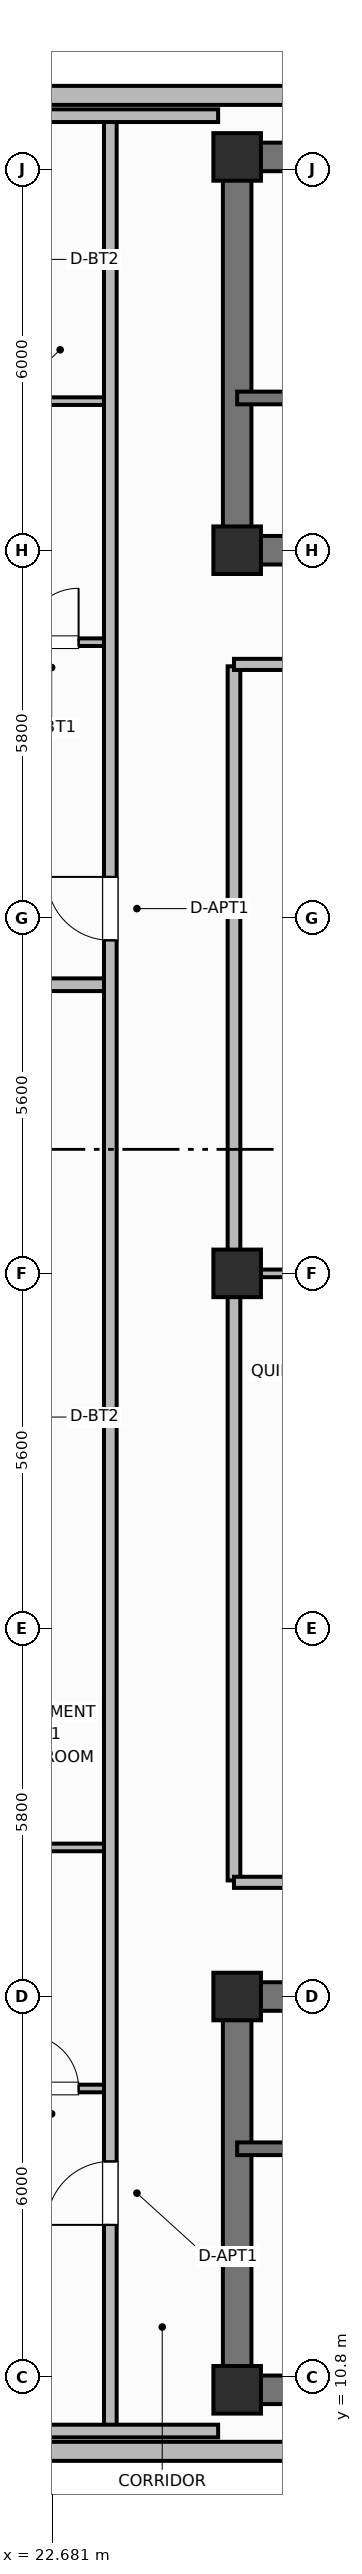
"""IFC4 building model, lengths in metres.
Left out: names, types, materials, properties, quantities, classifications, styles, units other than length and angle.
Written with IfcOpenShell. Run it as: python <this file> out.ifc"""

import sys

from ifc_helpers import new_model, si_unit, direction, frame, frame_2d, origin, origin_2d, place, context, subcontext, project, spatial, rectangle, extrude, element, fill, save


model = new_model("IFC4")
c1 = context("Model", 3, precision=1e-05, world=origin(), true_north=direction((0.0, 1.0)))
c2 = subcontext(c1, "Body", "Model", "MODEL_VIEW")
j1 = project(units=[si_unit("LENGTHUNIT", "METRE"), si_unit("PLANEANGLEUNIT", "RADIAN")], contexts=[c1])
p1 = place(None, origin())
s1 = spatial("IfcSite", under=j1, at=p1, CompositionType="ELEMENT")
p2 = place(p1, origin())
s2 = spatial("IfcBuilding", under=s1, at=p2, CompositionType="ELEMENT")
p3 = place(p2, frame((0.0, 0.0, 293.5)))
s3 = spatial("IfcBuildingStorey", under=s2, at=p3, CompositionType="ELEMENT", Elevation=293.5)
p4 = place(p3, frame((52.8, 10.6, 0.0), z_axis=(0.0, 0.0, 1.0), x_axis=(-1.0, 0.0, 0.0)))
e1 = element("IfcWall", 1, at=p4, inside=s3, PredefinedType="SHEAR", context=c2, shape_type="SweptSolid", body=[
    extrude(rectangle(XDim=27.2, YDim=0.45, at=frame_2d((13.6, 0.0))), origin(), (0.0, 0.0, 1.0), 3.7),
])
p5 = place(p3, frame((25.6, 10.825, 0.0), z_axis=(0.0, 0.0, 1.0), x_axis=(0.0, 1.0, 0.0)))
e2 = element("IfcWall", 2, at=p5, inside=s3, PredefinedType="SHEAR", context=c2, shape_type="SweptSolid", body=[
    extrude(rectangle(XDim=5.75, YDim=0.45, at=frame_2d((2.875, 0.0))), origin(), (0.0, 0.0, 1.0), 3.7),
])
p6 = place(p3, frame((25.6, 16.8, 0.0), z_axis=(0.0, 0.0, 1.0), x_axis=(1.0, 0.0, 0.0)))
e3 = element("IfcWall", 3, at=p6, inside=s3, PredefinedType="SHEAR", context=c2, shape_type="SweptSolid", body=[
    extrude(rectangle(XDim=27.2, YDim=0.45, at=frame_2d((13.6, 0.0))), origin(), (0.0, 0.0, 1.0), 3.7),
])
p7 = place(p6, frame((1.7, 0.0, 0.0)))
e4 = element("IfcOpeningElement", 4, at=p7, cuts=e3, PredefinedType="OPENING", context=c2, shape_type="SweptSolid", body=[
    extrude(rectangle(XDim=1.1, YDim=2.15, at=frame_2d((0.55, 1.075))), frame((0.0, 0.235, 0.0), z_axis=(0.0, -1.0, 0.0), x_axis=(1.0, 0.0, 0.0)), (0.0, 0.0, 1.0), 0.47),
])
p8 = place(p6, frame((4.45, 0.0, 0.0)))
e5 = element("IfcOpeningElement", 5, at=p8, cuts=e3, PredefinedType="OPENING", context=c2, shape_type="SweptSolid", body=[
    extrude(rectangle(XDim=0.85, YDim=2.1, at=frame_2d((0.425, 1.05))), frame((0.0, 0.235, 0.0), z_axis=(0.0, -1.0, 0.0), x_axis=(1.0, 0.0, 0.0)), (0.0, 0.0, 1.0), 0.47),
])
p9 = place(p6, frame((6.5, 0.0, 0.0)))
e6 = element("IfcOpeningElement", 6, at=p9, cuts=e3, PredefinedType="OPENING", context=c2, shape_type="SweptSolid", body=[
    extrude(rectangle(XDim=0.85, YDim=2.1, at=frame_2d((0.425, 1.05))), frame((0.0, 0.235, 0.0), z_axis=(0.0, -1.0, 0.0), x_axis=(1.0, 0.0, 0.0)), (0.0, 0.0, 1.0), 0.47),
])
p10 = place(p6, frame((13.0, 0.0, 0.0)))
e7 = element("IfcOpeningElement", 7, at=p10, cuts=e3, PredefinedType="OPENING", context=c2, shape_type="SweptSolid", body=[
    extrude(rectangle(XDim=1.2, YDim=2.15, at=frame_2d((0.6, 1.075))), frame((0.0, 0.235, 0.0), z_axis=(0.0, -1.0, 0.0), x_axis=(1.0, 0.0, 0.0)), (0.0, 0.0, 1.0), 0.47),
])
p11 = place(p6, frame((19.8, 0.0, 0.0)))
e8 = element("IfcOpeningElement", 8, at=p11, cuts=e3, PredefinedType="OPENING", context=c2, shape_type="SweptSolid", body=[
    extrude(rectangle(XDim=0.85, YDim=2.1, at=frame_2d((0.425, 1.05))), frame((0.0, 0.235, 0.0), z_axis=(0.0, -1.0, 0.0), x_axis=(1.0, 0.0, 0.0)), (0.0, 0.0, 1.0), 0.47),
])
p12 = place(p6, frame((24.2, 0.0, 0.0)))
e9 = element("IfcOpeningElement", 9, at=p12, cuts=e3, PredefinedType="OPENING", context=c2, shape_type="SweptSolid", body=[
    extrude(rectangle(XDim=0.85, YDim=2.1, at=frame_2d((0.425, 1.05))), frame((0.0, 0.235, 0.0), z_axis=(0.0, -1.0, 0.0), x_axis=(1.0, 0.0, 0.0)), (0.0, 0.0, 1.0), 0.47),
])
p13 = place(p3, frame((25.6, 45.8, 0.0), z_axis=(0.0, 0.0, 1.0), x_axis=(1.0, 0.0, 0.0)))
e10 = element("IfcWall", 10, at=p13, inside=s3, PredefinedType="SHEAR", context=c2, shape_type="SweptSolid", body=[
    extrude(rectangle(XDim=27.2, YDim=0.45, at=frame_2d((13.6, 0.0))), origin(), (0.0, 0.0, 1.0), 3.7),
])
p14 = place(p3, frame((25.6, 39.825, 0.0), z_axis=(0.0, 0.0, 1.0), x_axis=(0.0, 1.0, 0.0)))
e11 = element("IfcWall", 11, at=p14, inside=s3, PredefinedType="SHEAR", context=c2, shape_type="SweptSolid", body=[
    extrude(rectangle(XDim=5.75, YDim=0.45, at=frame_2d((2.875, 0.0))), origin(), (0.0, 0.0, 1.0), 3.7),
])
p15 = place(p3, frame((52.8, 39.6, 0.0), z_axis=(0.0, 0.0, 1.0), x_axis=(-1.0, 0.0, 0.0)))
e12 = element("IfcWall", 12, at=p15, inside=s3, PredefinedType="SHEAR", context=c2, shape_type="SweptSolid", body=[
    extrude(rectangle(XDim=27.2, YDim=0.45, at=frame_2d((13.6, 0.0))), origin(), (0.0, 0.0, 1.0), 3.7),
])
p16 = place(p15, frame((24.3, 0.0, 0.0)))
e13 = element("IfcOpeningElement", 13, at=p16, cuts=e12, PredefinedType="OPENING", context=c2, shape_type="SweptSolid", body=[
    extrude(rectangle(XDim=1.1, YDim=2.15, at=frame_2d((0.55, 1.075))), frame((0.0, 0.235, 0.0), z_axis=(0.0, -1.0, 0.0), x_axis=(1.0, 0.0, 0.0)), (0.0, 0.0, 1.0), 0.47),
])
p17 = place(p15, frame((21.85, 0.0, 0.0)))
e14 = element("IfcOpeningElement", 14, at=p17, cuts=e12, PredefinedType="OPENING", context=c2, shape_type="SweptSolid", body=[
    extrude(rectangle(XDim=0.85, YDim=2.1, at=frame_2d((0.425, 1.05))), frame((0.0, 0.235, 0.0), z_axis=(0.0, -1.0, 0.0), x_axis=(1.0, 0.0, 0.0)), (0.0, 0.0, 1.0), 0.47),
])
p18 = place(p15, frame((19.85, 0.0, 0.0)))
e15 = element("IfcOpeningElement", 15, at=p18, cuts=e12, PredefinedType="OPENING", context=c2, shape_type="SweptSolid", body=[
    extrude(rectangle(XDim=0.85, YDim=2.1, at=frame_2d((0.425, 1.05))), frame((0.0, 0.235, 0.0), z_axis=(0.0, -1.0, 0.0), x_axis=(1.0, 0.0, 0.0)), (0.0, 0.0, 1.0), 0.47),
])
p19 = place(p15, frame((15.1, 0.0, 0.0)))
e16 = element("IfcOpeningElement", 16, at=p19, cuts=e12, PredefinedType="OPENING", context=c2, shape_type="SweptSolid", body=[
    extrude(rectangle(XDim=1.2, YDim=2.15, at=frame_2d((0.6, 1.075))), frame((0.0, 0.235, 0.0), z_axis=(0.0, -1.0, 0.0), x_axis=(1.0, 0.0, 0.0)), (0.0, 0.0, 1.0), 0.47),
])
p20 = place(p15, frame((12.6, 0.0, 0.0)))
e17 = element("IfcOpeningElement", 17, at=p20, cuts=e12, PredefinedType="OPENING", context=c2, shape_type="SweptSolid", body=[
    extrude(rectangle(XDim=0.85, YDim=2.1, at=frame_2d((0.425, 1.05))), frame((0.0, 0.235, 0.0), z_axis=(0.0, -1.0, 0.0), x_axis=(1.0, 0.0, 0.0)), (0.0, 0.0, 1.0), 0.47),
])
p21 = place(p15, frame((10.85, 0.0, 0.0)))
e18 = element("IfcOpeningElement", 18, at=p21, cuts=e12, PredefinedType="OPENING", context=c2, shape_type="SweptSolid", body=[
    extrude(rectangle(XDim=0.85, YDim=2.1, at=frame_2d((0.425, 1.05))), frame((0.0, 0.235, 0.0), z_axis=(0.0, -1.0, 0.0), x_axis=(1.0, 0.0, 0.0)), (0.0, 0.0, 1.0), 0.47),
])
p22 = place(p15, frame((7.35, 0.0, 0.0)))
e19 = element("IfcOpeningElement", 19, at=p22, cuts=e12, PredefinedType="OPENING", context=c2, shape_type="SweptSolid", body=[
    extrude(rectangle(XDim=0.85, YDim=2.1, at=frame_2d((0.425, 1.05))), frame((0.0, 0.235, 0.0), z_axis=(0.0, -1.0, 0.0), x_axis=(1.0, 0.0, 0.0)), (0.0, 0.0, 1.0), 0.47),
])
p23 = place(p15, frame((4.2, 0.0, 0.0)))
e20 = element("IfcOpeningElement", 20, at=p23, cuts=e12, PredefinedType="OPENING", context=c2, shape_type="SweptSolid", body=[
    extrude(rectangle(XDim=1.3, YDim=2.2, at=frame_2d((0.65, 1.1))), frame((0.0, 0.235, 0.0), z_axis=(0.0, -1.0, 0.0), x_axis=(1.0, 0.0, 0.0)), (0.0, 0.0, 1.0), 0.47),
])
for number, where, z_axis, x_axis in (
    (21, (25.6, 10.6, 0.0), (0.0, 0.0, 1.0), (1.0, 0.0, 0.0)),
    (22, (25.6, 16.8, 0.0), (0.0, 0.0, 1.0), (1.0, 0.0, 0.0)),
    (23, (25.6, 39.6, 0.0), (0.0, 0.0, 1.0), (1.0, 0.0, 0.0)),
    (24, (25.6, 45.8, 0.0), (0.0, 0.0, 1.0), (1.0, 0.0, 0.0)),
    (25, (25.6, 28.2, 0.0), (0.0, 0.0, 1.0), (1.0, 0.0, 0.0)),
):
    element("IfcColumn", number, at=place(p3, frame(where, z_axis=z_axis, x_axis=x_axis)), inside=s3, PredefinedType="COLUMN", context=c2, shape_type="SweptSolid", body=[
        extrude(rectangle(XDim=0.75, YDim=0.75, at=origin_2d()), origin(), (0.0, 0.0, 1.0), 3.7),
    ])
p24 = place(p3, frame((22.56, 9.63, 0.0), z_axis=(0.0, 0.0, 1.0), x_axis=(1.0, 0.0, 0.0)))
e26 = element("IfcWall", 26, at=p24, inside=s3, PredefinedType="SOLIDWALL", context=c2, shape_type="SweptSolid", body=[
    extrude(rectangle(XDim=4.45, YDim=0.3, at=frame_2d((2.225, 0.0))), origin(), (0.0, 0.0, 1.0), 2.71),
])
p25 = place(p3, frame((48.19, 46.77, 0.0), z_axis=(0.0, 0.0, 1.0), x_axis=(-1.0, 0.0, 0.0)))
e27 = element("IfcWall", 27, at=p25, inside=s3, PredefinedType="SOLIDWALL", context=c2, shape_type="SweptSolid", body=[
    extrude(rectangle(XDim=25.63, YDim=0.3, at=frame_2d((12.815, 0.0))), origin(), (0.0, 0.0, 1.0), 2.71),
])
p26 = place(p25, frame((1.471, 0.0, 0.74)))
e28 = element("IfcOpeningElement", 28, at=p26, cuts=e27, PredefinedType="OPENING", context=c2, shape_type="SweptSolid", body=[
    extrude(rectangle(XDim=1.4, YDim=1.85, at=frame_2d((0.7, 0.925))), frame((0.0, 0.16, 0.0), z_axis=(0.0, -1.0, 0.0), x_axis=(1.0, 0.0, 0.0)), (0.0, 0.0, 1.0), 0.32),
])
p27 = place(p25, frame((7.553, 0.0, 0.74)))
e29 = element("IfcOpeningElement", 29, at=p27, cuts=e27, PredefinedType="OPENING", context=c2, shape_type="SweptSolid", body=[
    extrude(rectangle(XDim=1.4, YDim=1.85, at=frame_2d((0.7, 0.925))), frame((0.0, 0.16, 0.0), z_axis=(0.0, -1.0, 0.0), x_axis=(1.0, 0.0, 0.0)), (0.0, 0.0, 1.0), 0.32),
])
p28 = place(p25, frame((10.244, 0.0, 0.74)))
e30 = element("IfcOpeningElement", 30, at=p28, cuts=e27, PredefinedType="OPENING", context=c2, shape_type="SweptSolid", body=[
    extrude(rectangle(XDim=1.4, YDim=1.85, at=frame_2d((0.7, 0.925))), frame((0.0, 0.16, 0.0), z_axis=(0.0, -1.0, 0.0), x_axis=(1.0, 0.0, 0.0)), (0.0, 0.0, 1.0), 0.32),
])
p29 = place(p25, frame((14.336, 0.0, 0.74)))
e31 = element("IfcOpeningElement", 31, at=p29, cuts=e27, PredefinedType="OPENING", context=c2, shape_type="SweptSolid", body=[
    extrude(rectangle(XDim=1.4, YDim=1.85, at=frame_2d((0.7, 0.925))), frame((0.0, 0.16, 0.0), z_axis=(0.0, -1.0, 0.0), x_axis=(1.0, 0.0, 0.0)), (0.0, 0.0, 1.0), 0.32),
])
p30 = place(p25, frame((16.677, 0.0, 0.74)))
e32 = element("IfcOpeningElement", 32, at=p30, cuts=e27, PredefinedType="OPENING", context=c2, shape_type="SweptSolid", body=[
    extrude(rectangle(XDim=1.4, YDim=1.85, at=frame_2d((0.7, 0.925))), frame((0.0, 0.16, 0.0), z_axis=(0.0, -1.0, 0.0), x_axis=(1.0, 0.0, 0.0)), (0.0, 0.0, 1.0), 0.32),
])
p31 = place(p25, frame((19.718, 0.0, 0.74)))
e33 = element("IfcOpeningElement", 33, at=p31, cuts=e27, PredefinedType="OPENING", context=c2, shape_type="SweptSolid", body=[
    extrude(rectangle(XDim=1.4, YDim=1.85, at=frame_2d((0.7, 0.925))), frame((0.0, 0.16, 0.0), z_axis=(0.0, -1.0, 0.0), x_axis=(1.0, 0.0, 0.0)), (0.0, 0.0, 1.0), 0.32),
])
p32 = place(p3, frame((25.6, 14.4, 0.0), z_axis=(0.0, 0.0, 1.0), x_axis=(1.0, 0.0, 0.0)))
e34 = element("IfcWall", 34, at=p32, inside=s3, PredefinedType="SHEAR", context=c2, shape_type="SweptSolid", body=[
    extrude(rectangle(XDim=9.55, YDim=0.2, at=frame_2d((4.775, 0.0))), origin(), (0.0, 0.0, 1.0), 3.7),
])
p33 = place(p32, frame((1.05, 0.0, 0.0)))
e35 = element("IfcOpeningElement", 35, at=p33, cuts=e34, PredefinedType="OPENING", context=c2, shape_type="SweptSolid", body=[
    extrude(rectangle(XDim=1.1, YDim=2.15, at=frame_2d((0.55, 1.075))), frame((0.0, 0.11, 0.0), z_axis=(0.0, -1.0, 0.0), x_axis=(1.0, 0.0, 0.0)), (0.0, 0.0, 1.0), 0.22),
])
p34 = place(p3, frame((35.15, 42.0, 0.0), z_axis=(0.0, 0.0, 1.0), x_axis=(-1.0, 0.0, 0.0)))
e36 = element("IfcWall", 36, at=p34, inside=s3, PredefinedType="SHEAR", context=c2, shape_type="SweptSolid", body=[
    extrude(rectangle(XDim=9.55, YDim=0.2, at=frame_2d((4.775, 0.0))), origin(), (0.0, 0.0, 1.0), 3.7),
])
p35 = place(p34, frame((7.25, 0.0, 0.0)))
e37 = element("IfcOpeningElement", 37, at=p35, cuts=e36, PredefinedType="OPENING", context=c2, shape_type="SweptSolid", body=[
    extrude(rectangle(XDim=1.1, YDim=2.15, at=frame_2d((0.55, 1.075))), frame((0.0, 0.11, 0.0), z_axis=(0.0, -1.0, 0.0), x_axis=(1.0, 0.0, 0.0)), (0.0, 0.0, 1.0), 0.22),
])
p36 = place(p3, frame((25.55, 18.63, 0.0), z_axis=(0.0, 0.0, 1.0), x_axis=(0.0, 1.0, 0.0)))
e38 = element("IfcWall", 38, at=p36, inside=s3, PredefinedType="PARTITIONING", context=c2, shape_type="SweptSolid", body=[
    extrude(rectangle(XDim=19.14, YDim=0.2, at=frame_2d((9.57, 0.0))), origin(), (0.0, 0.0, 1.0), 2.54),
])
for number, where, z_axis, x_axis in (
    (39, (25.55, 18.6, 0.0), (0.0, 0.0, 1.0), (1.0, 0.0, 0.0)),
    (40, (25.55, 37.8, 0.0), (0.0, 0.0, 1.0), (1.0, 0.0, 0.0)),
):
    element("IfcWall", number, at=place(p3, frame(where, z_axis=z_axis, x_axis=x_axis)), inside=s3, PredefinedType="PARTITIONING", context=c2, shape_type="SweptSolid", body=[
        extrude(rectangle(XDim=2.7, YDim=0.175, at=frame_2d((1.35, 0.0))), origin(), (0.0, 0.0, 1.0), 2.54),
    ])
p37 = place(p3, frame((25.6, 28.2, 0.0), z_axis=(0.0, 0.0, 1.0), x_axis=(1.0, 0.0, 0.0)))
e41 = element("IfcWall", 41, at=p37, inside=s3, PredefinedType="PARTITIONING", context=c2, shape_type="SweptSolid", body=[
    extrude(rectangle(XDim=2.66, YDim=0.12, at=frame_2d((1.33, 0.0))), origin(), (0.0, 0.0, 1.0), 2.54),
])
p38 = place(p3, frame((21.65, 15.35, 0.0), z_axis=(0.0, 0.0, 1.0), x_axis=(1.0, 0.0, 0.0)))
e42 = element("IfcWall", 42, at=p38, inside=s3, PredefinedType="PARTITIONING", context=c2, shape_type="SweptSolid", body=[
    extrude(rectangle(XDim=1.95, YDim=0.12, at=frame_2d((0.975, 0.0))), origin(), (0.0, 0.0, 1.0), 2.54),
])
p39 = place(p38, frame((0.6, 0.0, 0.0)))
e43 = element("IfcOpeningElement", 43, at=p39, cuts=e42, PredefinedType="OPENING", context=c2, shape_type="SweptSolid", body=[
    extrude(rectangle(XDim=0.85, YDim=2.1, at=frame_2d((0.425, 1.05))), frame((0.0, 0.07, 0.0), z_axis=(0.0, -1.0, 0.0), x_axis=(1.0, 0.0, 0.0)), (0.0, 0.0, 1.0), 0.14),
])
p40 = place(p3, frame((21.65, 19.15, 0.0), z_axis=(0.0, 0.0, 1.0), x_axis=(1.0, 0.0, 0.0)))
e44 = element("IfcWall", 44, at=p40, inside=s3, PredefinedType="PARTITIONING", context=c2, shape_type="SweptSolid", body=[
    extrude(rectangle(XDim=1.95, YDim=0.12, at=frame_2d((0.975, 0.0))), origin(), (0.0, 0.0, 1.0), 2.54),
])
p41 = place(p3, frame((19.53, 32.75, 0.0), z_axis=(0.0, 0.0, 1.0), x_axis=(1.0, 0.0, 0.0)))
e45 = element("IfcWall", 45, at=p41, inside=s3, PredefinedType="PARTITIONING", context=c2, shape_type="SweptSolid", body=[
    extrude(rectangle(XDim=4.07, YDim=0.2, at=frame_2d((2.035, 0.0))), origin(), (0.0, 0.0, 1.0), 2.54),
])
p42 = place(p3, frame((21.65, 38.15, 0.0), z_axis=(0.0, 0.0, 1.0), x_axis=(1.0, 0.0, 0.0)))
e46 = element("IfcWall", 46, at=p42, inside=s3, PredefinedType="PARTITIONING", context=c2, shape_type="SweptSolid", body=[
    extrude(rectangle(XDim=1.95, YDim=0.12, at=frame_2d((0.975, 0.0))), origin(), (0.0, 0.0, 1.0), 2.54),
])
p43 = place(p42, frame((0.6, 0.0, 0.0)))
e47 = element("IfcOpeningElement", 47, at=p43, cuts=e46, PredefinedType="OPENING", context=c2, shape_type="SweptSolid", body=[
    extrude(rectangle(XDim=0.85, YDim=2.1, at=frame_2d((0.425, 1.05))), frame((0.0, 0.07, 0.0), z_axis=(0.0, -1.0, 0.0), x_axis=(1.0, 0.0, 0.0)), (0.0, 0.0, 1.0), 0.14),
])
p44 = place(p3, frame((21.65, 41.95, 0.0), z_axis=(0.0, 0.0, 1.0), x_axis=(1.0, 0.0, 0.0)))
e48 = element("IfcWall", 48, at=p44, inside=s3, PredefinedType="PARTITIONING", context=c2, shape_type="SweptSolid", body=[
    extrude(rectangle(XDim=1.95, YDim=0.12, at=frame_2d((0.975, 0.0))), origin(), (0.0, 0.0, 1.0), 2.54),
])
p45 = place(p3, frame((23.6, 9.95, 0.0), z_axis=(0.0, 0.0, 1.0), x_axis=(0.0, 1.0, 0.0)))
e49 = element("IfcWall", 49, at=p45, inside=s3, PredefinedType="PARTITIONING", context=c2, shape_type="SweptSolid", body=[
    extrude(rectangle(XDim=36.5, YDim=0.2, at=frame_2d((18.25, 0.0))), origin(), (0.0, 0.0, 1.0), 2.54),
])
p46 = place(p45, frame((3.25, 0.0, 0.0)))
e50 = element("IfcOpeningElement", 50, at=p46, cuts=e49, PredefinedType="OPENING", context=c2, shape_type="SweptSolid", body=[
    extrude(rectangle(XDim=1.0, YDim=2.15, at=frame_2d((0.5, 1.075))), frame((0.0, 0.11, 0.0), z_axis=(0.0, -1.0, 0.0), x_axis=(1.0, 0.0, 0.0)), (0.0, 0.0, 1.0), 0.22),
])
p47 = place(p45, frame((23.5, 0.0, 0.0)))
e51 = element("IfcOpeningElement", 51, at=p47, cuts=e49, PredefinedType="OPENING", context=c2, shape_type="SweptSolid", body=[
    extrude(rectangle(XDim=1.0, YDim=2.15, at=frame_2d((0.5, 1.075))), frame((0.0, 0.11, 0.0), z_axis=(0.0, -1.0, 0.0), x_axis=(1.0, 0.0, 0.0)), (0.0, 0.0, 1.0), 0.22),
])
for number, where, z_axis, x_axis in (
    (52, (21.546, 9.95, 0.0), (0.0, 0.0, 1.0), (1.0, 0.0, 0.0)),
    (53, (21.546, 46.45, 0.0), (0.0, 0.0, 1.0), (1.0, 0.0, 0.0)),
):
    element("IfcWall", number, at=place(p3, frame(where, z_axis=z_axis, x_axis=x_axis)), inside=s3, PredefinedType="PARTITIONING", context=c2, shape_type="SweptSolid", body=[
        extrude(rectangle(XDim=3.754, YDim=0.2, at=frame_2d((1.877, 0.0))), origin(), (0.0, 0.0, 1.0), 2.54),
    ])
p48 = place(p39, origin())
e54 = element("IfcDoor", 54, at=p48, inside=s3, OperationType="SINGLE_SWING_LEFT", PredefinedType="DOOR", context=c2, shape_type="SweptSolid", body=[
    extrude(rectangle(XDim=0.85, YDim=2.1, at=frame_2d((0.425, 1.05))), frame((0.0, 0.025, 0.0), z_axis=(0.0, -1.0, 0.0), x_axis=(1.0, 0.0, 0.0)), (0.0, 0.0, 1.0), 0.05),
])
fill(e43, e54)
p49 = place(p43, origin())
e55 = element("IfcDoor", 55, at=p49, inside=s3, OperationType="SINGLE_SWING_RIGHT", PredefinedType="DOOR", context=c2, shape_type="SweptSolid", body=[
    extrude(rectangle(XDim=0.85, YDim=2.1, at=frame_2d((0.425, 1.05))), frame((0.0, 0.025, 0.0), z_axis=(0.0, -1.0, 0.0), x_axis=(1.0, 0.0, 0.0)), (0.0, 0.0, 1.0), 0.05),
])
fill(e47, e55)
p50 = place(p46, origin())
e56 = element("IfcDoor", 56, at=p50, inside=s3, OperationType="SINGLE_SWING_LEFT", PredefinedType="DOOR", context=c2, shape_type="SweptSolid", body=[
    extrude(rectangle(XDim=1.0, YDim=2.15, at=frame_2d((0.5, 1.075))), frame((0.0, 0.025, 0.0), z_axis=(0.0, -1.0, 0.0), x_axis=(1.0, 0.0, 0.0)), (0.0, 0.0, 1.0), 0.05),
])
fill(e50, e56)
p51 = place(p47, origin())
e57 = element("IfcDoor", 57, at=p51, inside=s3, OperationType="SINGLE_SWING_RIGHT", PredefinedType="DOOR", context=c2, shape_type="SweptSolid", body=[
    extrude(rectangle(XDim=1.0, YDim=2.15, at=frame_2d((0.5, 1.075))), frame((0.0, 0.025, 0.0), z_axis=(0.0, -1.0, 0.0), x_axis=(1.0, 0.0, 0.0)), (0.0, 0.0, 1.0), 0.05),
])
fill(e51, e57)
save(model, sys.argv[1])
